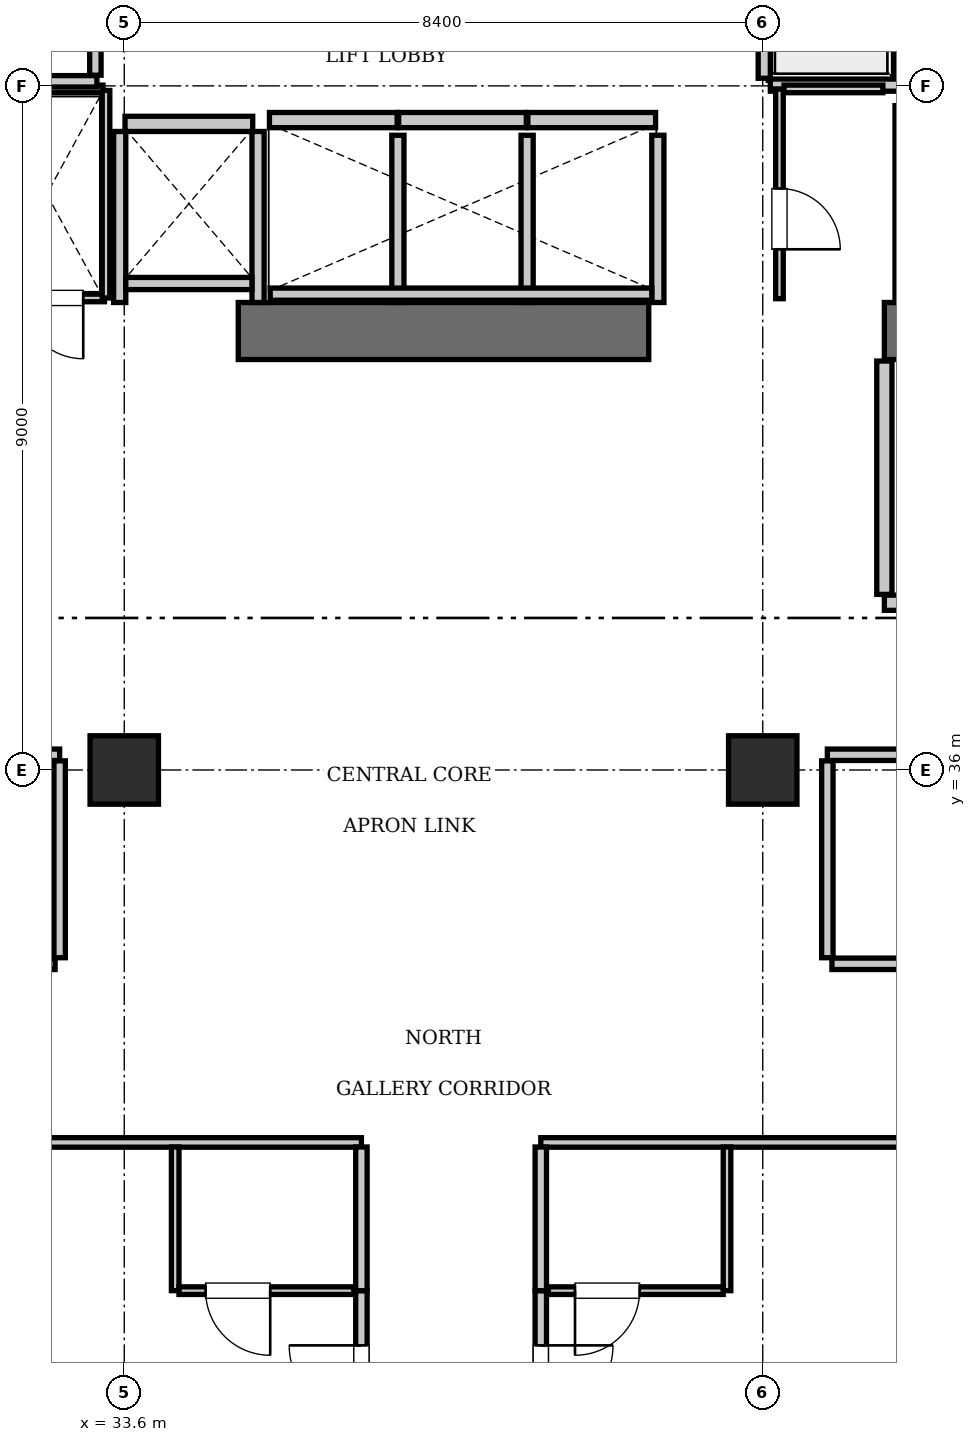
"""IFC4 building model, lengths in metres.
Left out: names, types, materials, properties, quantities, classifications, styles, units other than length and angle.
Written with IfcOpenShell. Run it as: python <this file> out.ifc"""

import sys

from ifc_helpers import new_model, si_unit, direction, frame, frame_2d, origin, origin_2d, place, context, subcontext, project, spatial, rectangle, extrude, element, fill, save


model = new_model("IFC4")
c1 = context("Model", 3, precision=1e-05, world=origin(), true_north=direction((0.0, 1.0)))
c2 = subcontext(c1, "Body", "Model", "MODEL_VIEW")
j1 = project(units=[si_unit("LENGTHUNIT", "METRE"), si_unit("PLANEANGLEUNIT", "RADIAN")], contexts=[c1])
p1 = place(None, origin())
s1 = spatial("IfcSite", under=j1, at=p1, CompositionType="ELEMENT")
p2 = place(p1, origin())
s2 = spatial("IfcBuilding", under=s1, at=p2, CompositionType="ELEMENT")
p3 = place(p2, frame((0.0, 0.0, 212.1)))
s3 = spatial("IfcBuildingStorey", under=s2, at=p3, CompositionType="ELEMENT", Elevation=212.1)
p4 = place(p3, frame((35.1, 41.775, 0.0), z_axis=(0.0, 0.0, 1.0), x_axis=(1.0, 0.0, 0.0)))
e1 = element("IfcWall", 1, at=p4, inside=s3, PredefinedType="SHEAR", context=c2, shape_type="SweptSolid", body=[
    extrude(rectangle(XDim=5.4, YDim=0.75, at=frame_2d((2.7, 0.0))), origin(), (0.0, 0.0, 1.0), 3.85),
])
p5 = place(p3, frame((43.6, 41.775, 0.0), z_axis=(0.0, 0.0, 1.0), x_axis=(1.0, 0.0, 0.0)))
e2 = element("IfcWall", 2, at=p5, inside=s3, PredefinedType="SHEAR", context=c2, shape_type="SweptSolid", body=[
    extrude(rectangle(XDim=6.8, YDim=0.75, at=frame_2d((3.4, 0.0))), origin(), (0.0, 0.0, 1.0), 3.85),
])
p6 = place(p5, frame((3.9, 0.0, 0.0)))
e3 = element("IfcOpeningElement", 3, at=p6, cuts=e2, PredefinedType="OPENING", context=c2, shape_type="SweptSolid", body=[
    extrude(rectangle(XDim=1.15, YDim=2.15, at=frame_2d((0.575, 1.075))), frame((0.0, 0.385, 0.0), z_axis=(0.0, -1.0, 0.0), x_axis=(1.0, 0.0, 0.0)), (0.0, 0.0, 1.0), 0.77),
])
p7 = place(p5, frame((0.55, 0.0, 0.0)))
e4 = element("IfcOpeningElement", 4, at=p7, cuts=e2, PredefinedType="OPENING", context=c2, shape_type="SweptSolid", body=[
    extrude(rectangle(XDim=1.1, YDim=2.2, at=frame_2d((0.55, 1.1))), frame((0.0, 0.385, 0.0), z_axis=(0.0, -1.0, 0.0), x_axis=(1.0, 0.0, 0.0)), (0.0, 0.0, 1.0), 0.77),
])
for number, where, z_axis, x_axis in (
    (5, (33.6, 36.0, 0.0), (0.0, 0.0, 1.0), (1.0, 0.0, 0.0)),
    (6, (42.0, 36.0, 0.0), (0.0, 0.0, 1.0), (1.0, 0.0, 0.0)),
):
    element("IfcColumn", number, at=place(p3, frame(where, z_axis=z_axis, x_axis=x_axis)), inside=s3, PredefinedType="COLUMN", context=c2, shape_type="SweptSolid", body=[
        extrude(rectangle(XDim=0.9, YDim=0.9, at=origin_2d()), origin(), (0.0, 0.0, 1.0), 3.85),
    ])
for number, where, z_axis, x_axis in (
    (7, (35.51, 44.55, 0.0), (0.0, 0.0, 1.0), (1.0, 0.0, 0.0)),
    (8, (37.21, 44.55, 0.0), (0.0, 0.0, 1.0), (1.0, 0.0, 0.0)),
):
    element("IfcWall", number, at=place(p3, frame(where, z_axis=z_axis, x_axis=x_axis)), inside=s3, PredefinedType="SOLIDWALL", context=c2, shape_type="SweptSolid", body=[
        extrude(rectangle(XDim=1.68, YDim=0.2, at=frame_2d((0.84, 0.0))), origin(), (0.0, 0.0, 1.0), 3.61),
    ])
p8 = place(p3, frame((38.91, 44.55, 0.0), z_axis=(0.0, 0.0, 1.0), x_axis=(1.0, 0.0, 0.0)))
e9 = element("IfcWall", 9, at=p8, inside=s3, PredefinedType="SOLIDWALL", context=c2, shape_type="SweptSolid", body=[
    extrude(rectangle(XDim=1.68, YDim=0.2, at=frame_2d((0.84, 0.0))), origin(), (0.0, 0.0, 1.0), 3.61),
])
p9 = place(p3, frame((33.61, 44.5, 0.0), z_axis=(0.0, 0.0, 1.0), x_axis=(1.0, 0.0, 0.0)))
e10 = element("IfcWall", 10, at=p9, inside=s3, PredefinedType="SOLIDWALL", context=c2, shape_type="SweptSolid", body=[
    extrude(rectangle(XDim=1.68, YDim=0.2, at=frame_2d((0.84, 0.0))), origin(), (0.0, 0.0, 1.0), 3.61),
])
p10 = place(p3, frame((43.82, 42.15, 0.0), z_axis=(0.0, 0.0, 1.0), x_axis=(0.0, 1.0, 0.0)))
e11 = element("IfcWall", 11, at=p10, inside=s3, PredefinedType="SOLIDWALL", context=c2, shape_type="SweptSolid", body=[
    extrude(rectangle(XDim=2.59, YDim=0.16, at=frame_2d((1.295, 0.0))), origin(), (0.0, 0.0, 1.0), 3.61),
])
for number, where, z_axis, x_axis in (
    (12, (42.02, 45.1, 0.0), (0.0, 0.0, 1.0), (0.0, 1.0, 0.0)),
    (13, (43.8, 45.1, 0.0), (0.0, 0.0, 1.0), (0.0, 1.0, 0.0)),
):
    element("IfcWall", number, at=place(p3, frame(where, z_axis=z_axis, x_axis=x_axis)), inside=s3, PredefinedType="SOLIDWALL", context=c2, shape_type="SweptSolid", body=[
        extrude(rectangle(XDim=1.95, YDim=0.16, at=frame_2d((0.975, 0.0))), origin(), (0.0, 0.0, 1.0), 3.61),
    ])
p11 = place(p3, frame((42.1, 45.01, 0.0), z_axis=(0.0, 0.0, 1.0), x_axis=(1.0, 0.0, 0.0)))
e14 = element("IfcWall", 14, at=p11, inside=s3, PredefinedType="SOLIDWALL", context=c2, shape_type="SweptSolid", body=[
    extrude(rectangle(XDim=3.45, YDim=0.16, at=frame_2d((1.725, 0.0))), origin(), (0.0, 0.0, 1.0), 3.61),
])
for number, where, z_axis, x_axis in (
    (15, (37.2, 42.15, 0.0), (0.0, 0.0, 1.0), (0.0, 1.0, 0.0)),
    (16, (38.9, 42.15, 0.0), (0.0, 0.0, 1.0), (0.0, 1.0, 0.0)),
    (17, (40.62, 42.15, 0.0), (0.0, 0.0, 1.0), (0.0, 1.0, 0.0)),
):
    element("IfcWall", number, at=place(p3, frame(where, z_axis=z_axis, x_axis=x_axis)), inside=s3, PredefinedType="SOLIDWALL", context=c2, shape_type="SweptSolid", body=[
        extrude(rectangle(XDim=2.2, YDim=0.16, at=frame_2d((1.1, 0.0))), origin(), (0.0, 0.0, 1.0), 3.61),
    ])
p12 = place(p3, frame((35.52, 42.26, 0.0), z_axis=(0.0, 0.0, 1.0), x_axis=(1.0, 0.0, 0.0)))
e18 = element("IfcWall", 18, at=p12, inside=s3, PredefinedType="SOLIDWALL", context=c2, shape_type="SweptSolid", body=[
    extrude(rectangle(XDim=5.02, YDim=0.16, at=frame_2d((2.51, 0.0))), origin(), (0.0, 0.0, 1.0), 3.61),
])
for number, where, z_axis, x_axis in (
    (19, (33.54, 42.15, 0.0), (0.0, 0.0, 1.0), (0.0, 1.0, 0.0)),
    (20, (35.36, 42.15, 0.0), (0.0, 0.0, 1.0), (0.0, 1.0, 0.0)),
):
    element("IfcWall", number, at=place(p3, frame(where, z_axis=z_axis, x_axis=x_axis)), inside=s3, PredefinedType="SOLIDWALL", context=c2, shape_type="SweptSolid", body=[
        extrude(rectangle(XDim=2.25, YDim=0.16, at=frame_2d((1.125, 0.0))), origin(), (0.0, 0.0, 1.0), 3.61),
    ])
p13 = place(p3, frame((33.62, 42.4, 0.0), z_axis=(0.0, 0.0, 1.0), x_axis=(1.0, 0.0, 0.0)))
e21 = element("IfcWall", 21, at=p13, inside=s3, PredefinedType="SOLIDWALL", context=c2, shape_type="SweptSolid", body=[
    extrude(rectangle(XDim=1.66, YDim=0.16, at=frame_2d((0.83, 0.0))), origin(), (0.0, 0.0, 1.0), 3.61),
])
p14 = place(p3, frame((43.6, 38.2, 0.0), z_axis=(0.0, 0.0, 1.0), x_axis=(1.0, 0.0, 0.0)))
e22 = element("IfcWall", 22, at=p14, inside=s3, PredefinedType="PARTITIONING", context=c2, shape_type="SweptSolid", body=[
    extrude(rectangle(XDim=5.8, YDim=0.2, at=frame_2d((2.9, 0.0))), origin(), (0.0, 0.0, 1.0), 3.61),
])
p15 = place(p14, frame((2.3, 0.0, 0.0)))
e23 = element("IfcOpeningElement", 23, at=p15, cuts=e22, PredefinedType="OPENING", context=c2, shape_type="SweptSolid", body=[
    extrude(rectangle(XDim=1.15, YDim=2.15, at=frame_2d((0.575, 1.075))), frame((0.0, 0.11, 0.0), z_axis=(0.0, -1.0, 0.0), x_axis=(1.0, 0.0, 0.0)), (0.0, 0.0, 1.0), 0.22),
])
p16 = place(p3, frame((43.6, 38.31, 0.0), z_axis=(0.0, 0.0, 1.0), x_axis=(0.0, 1.0, 0.0)))
e24 = element("IfcWall", 24, at=p16, inside=s3, PredefinedType="PARTITIONING", context=c2, shape_type="SweptSolid", body=[
    extrude(rectangle(XDim=3.07, YDim=0.2, at=frame_2d((1.535, 0.0))), origin(), (0.0, 0.0, 1.0), 3.61),
])
p17 = place(p3, frame((32.02, 42.21, 0.0), z_axis=(0.0, 0.0, 1.0), x_axis=(1.0, 0.0, 0.0)))
e25 = element("IfcWall", 25, at=p17, inside=s3, PredefinedType="PARTITIONING", context=c2, shape_type="SweptSolid", body=[
    extrude(rectangle(XDim=1.32, YDim=0.1, at=frame_2d((0.66, 0.0))), origin(), (0.0, 0.0, 1.0), 3.61),
])
p18 = place(p17, frame((0.24, 0.0, 0.0)))
e26 = element("IfcOpeningElement", 26, at=p18, cuts=e25, PredefinedType="OPENING", context=c2, shape_type="SweptSolid", body=[
    extrude(rectangle(XDim=0.8, YDim=2.05, at=frame_2d((0.4, 1.025))), frame((0.0, 0.06, 0.0), z_axis=(0.0, -1.0, 0.0), x_axis=(1.0, 0.0, 0.0)), (0.0, 0.0, 1.0), 0.12),
])
p19 = place(p3, frame((31.84, 44.96, 0.0), z_axis=(0.0, 0.0, 1.0), x_axis=(1.0, 0.0, 0.0)))
e27 = element("IfcWall", 27, at=p19, inside=s3, PredefinedType="PARTITIONING", context=c2, shape_type="SweptSolid", body=[
    extrude(rectangle(XDim=1.48, YDim=0.1, at=frame_2d((0.74, 0.0))), origin(), (0.0, 0.0, 1.0), 3.61),
])
p20 = place(p3, frame((33.36, 42.21, 0.0), z_axis=(0.0, 0.0, 1.0), x_axis=(0.0, 1.0, 0.0)))
e28 = element("IfcWall", 28, at=p20, inside=s3, PredefinedType="PARTITIONING", context=c2, shape_type="SweptSolid", body=[
    extrude(rectangle(XDim=2.73, YDim=0.1, at=frame_2d((1.365, 0.0))), origin(), (0.0, 0.0, 1.0), 3.61),
])
p21 = place(p3, frame((42.22, 42.2, 0.0), z_axis=(0.0, 0.0, 1.0), x_axis=(0.0, 1.0, 0.0)))
e29 = element("IfcWall", 29, at=p21, inside=s3, PredefinedType="PARTITIONING", context=c2, shape_type="SweptSolid", body=[
    extrude(rectangle(XDim=2.76, YDim=0.1, at=frame_2d((1.38, 0.0))), origin(), (0.0, 0.0, 1.0), 3.61),
])
p22 = place(p21, frame((0.65, 0.0, 0.0)))
e30 = element("IfcOpeningElement", 30, at=p22, cuts=e29, PredefinedType="OPENING", context=c2, shape_type="SweptSolid", body=[
    extrude(rectangle(XDim=0.8, YDim=2.05, at=frame_2d((0.4, 1.025))), frame((0.0, 0.06, 0.0), z_axis=(0.0, -1.0, 0.0), x_axis=(1.0, 0.0, 0.0)), (0.0, 0.0, 1.0), 0.12),
])
p23 = place(p3, frame((42.28, 44.96, 0.0), z_axis=(0.0, 0.0, 1.0), x_axis=(1.0, 0.0, 0.0)))
e31 = element("IfcWall", 31, at=p23, inside=s3, PredefinedType="PARTITIONING", context=c2, shape_type="SweptSolid", body=[
    extrude(rectangle(XDim=1.3, YDim=0.1, at=frame_2d((0.65, 0.0))), origin(), (0.0, 0.0, 1.0), 3.61),
])
p24 = place(p3, frame((30.06, 45.06, 0.0), z_axis=(0.0, 0.0, 1.0), x_axis=(1.0, 0.0, 0.0)))
e32 = element("IfcWall", 32, at=p24, inside=s3, PredefinedType="PARTITIONING", context=c2, shape_type="SweptSolid", body=[
    extrude(rectangle(XDim=3.18, YDim=0.15, at=frame_2d((1.59, 0.0))), origin(), (0.0, 0.0, 1.0), 3.61),
])
p25 = place(p3, frame((33.22, 45.14, 0.0), z_axis=(0.0, 0.0, 1.0), x_axis=(0.0, 1.0, 0.0)))
e33 = element("IfcWall", 33, at=p25, inside=s3, PredefinedType="PARTITIONING", context=c2, shape_type="SweptSolid", body=[
    extrude(rectangle(XDim=4.16, YDim=0.15, at=frame_2d((2.08, 0.0))), origin(), (0.0, 0.0, 1.0), 3.61),
])
p26 = place(p3, frame((28.32, 36.2, 0.0), z_axis=(0.0, 0.0, 1.0), x_axis=(1.0, 0.0, 0.0)))
e34 = element("IfcWall", 34, at=p26, inside=s3, PredefinedType="PARTITIONING", context=c2, shape_type="SweptSolid", body=[
    extrude(rectangle(XDim=4.43, YDim=0.15, at=frame_2d((2.215, 0.0))), origin(), (0.0, 0.0, 1.0), 3.61),
])
p27 = place(p3, frame((32.75, 33.53, 0.0), z_axis=(0.0, 0.0, 1.0), x_axis=(0.0, 1.0, 0.0)))
e35 = element("IfcWall", 35, at=p27, inside=s3, PredefinedType="PARTITIONING", context=c2, shape_type="SweptSolid", body=[
    extrude(rectangle(XDim=2.59, YDim=0.15, at=frame_2d((1.295, 0.0))), origin(), (0.0, 0.0, 1.0), 3.61),
])
p28 = place(p3, frame((28.38, 33.45, 0.0), z_axis=(0.0, 0.0, 1.0), x_axis=(1.0, 0.0, 0.0)))
e36 = element("IfcWall", 36, at=p28, inside=s3, PredefinedType="PARTITIONING", context=c2, shape_type="SweptSolid", body=[
    extrude(rectangle(XDim=4.31, YDim=0.15, at=frame_2d((2.155, 0.0))), origin(), (0.0, 0.0, 1.0), 3.61),
])
p29 = place(p28, frame((1.705, 0.0, 0.0)))
e37 = element("IfcOpeningElement", 37, at=p29, cuts=e36, PredefinedType="OPENING", context=c2, shape_type="SweptSolid", body=[
    extrude(rectangle(XDim=0.9, YDim=2.1, at=frame_2d((0.45, 1.05))), frame((0.0, 0.085, 0.0), z_axis=(0.0, -1.0, 0.0), x_axis=(1.0, 0.0, 0.0)), (0.0, 0.0, 1.0), 0.17),
])
p30 = place(p3, frame((42.85, 36.2, 0.0), z_axis=(0.0, 0.0, 1.0), x_axis=(1.0, 0.0, 0.0)))
e38 = element("IfcWall", 38, at=p30, inside=s3, PredefinedType="PARTITIONING", context=c2, shape_type="SweptSolid", body=[
    extrude(rectangle(XDim=4.43, YDim=0.15, at=frame_2d((2.215, 0.0))), origin(), (0.0, 0.0, 1.0), 3.61),
])
p31 = place(p3, frame((42.85, 33.53, 0.0), z_axis=(0.0, 0.0, 1.0), x_axis=(0.0, 1.0, 0.0)))
e39 = element("IfcWall", 39, at=p31, inside=s3, PredefinedType="PARTITIONING", context=c2, shape_type="SweptSolid", body=[
    extrude(rectangle(XDim=2.59, YDim=0.15, at=frame_2d((1.295, 0.0))), origin(), (0.0, 0.0, 1.0), 3.61),
])
p32 = place(p3, frame((42.91, 33.45, 0.0), z_axis=(0.0, 0.0, 1.0), x_axis=(1.0, 0.0, 0.0)))
e40 = element("IfcWall", 40, at=p32, inside=s3, PredefinedType="PARTITIONING", context=c2, shape_type="SweptSolid", body=[
    extrude(rectangle(XDim=4.31, YDim=0.15, at=frame_2d((2.155, 0.0))), origin(), (0.0, 0.0, 1.0), 3.61),
])
p33 = place(p32, frame((1.705, 0.0, 0.0)))
e41 = element("IfcOpeningElement", 41, at=p33, cuts=e40, PredefinedType="OPENING", context=c2, shape_type="SweptSolid", body=[
    extrude(rectangle(XDim=0.9, YDim=2.1, at=frame_2d((0.45, 1.05))), frame((0.0, 0.085, 0.0), z_axis=(0.0, -1.0, 0.0), x_axis=(1.0, 0.0, 0.0)), (0.0, 0.0, 1.0), 0.17),
])
p34 = place(p3, frame((13.2, 31.1, 0.0), z_axis=(0.0, 0.0, 1.0), x_axis=(1.0, 0.0, 0.0)))
e42 = element("IfcWall", 42, at=p34, inside=s3, PredefinedType="PARTITIONING", context=c2, shape_type="SweptSolid", body=[
    extrude(rectangle(XDim=23.52, YDim=0.125, at=frame_2d((11.76, 0.0))), origin(), (0.0, 0.0, 1.0), 3.61),
])
p35 = place(p3, frame((39.08, 31.1, 0.0), z_axis=(0.0, 0.0, 1.0), x_axis=(1.0, 0.0, 0.0)))
e43 = element("IfcWall", 43, at=p35, inside=s3, PredefinedType="PARTITIONING", context=c2, shape_type="SweptSolid", body=[
    extrude(rectangle(XDim=23.32, YDim=0.125, at=frame_2d((11.66, 0.0))), origin(), (0.0, 0.0, 1.0), 3.61),
])
p36 = place(p3, frame((36.72, 26.76, 0.0), z_axis=(0.0, 0.0, 1.0), x_axis=(0.0, 1.0, 0.0)))
e44 = element("IfcWall", 44, at=p36, inside=s3, PredefinedType="PARTITIONING", context=c2, shape_type="SweptSolid", body=[
    extrude(rectangle(XDim=2.39, YDim=0.15, at=frame_2d((1.195, 0.0))), origin(), (0.0, 0.0, 1.0), 3.61),
])
p37 = place(p36, frame((0.72, 0.0, 0.0)))
e45 = element("IfcOpeningElement", 45, at=p37, cuts=e44, PredefinedType="OPENING", context=c2, shape_type="SweptSolid", body=[
    extrude(rectangle(XDim=0.95, YDim=2.15, at=frame_2d((0.475, 1.075))), frame((0.0, 0.085, 0.0), z_axis=(0.0, -1.0, 0.0), x_axis=(1.0, 0.0, 0.0)), (0.0, 0.0, 1.0), 0.17),
])
p38 = place(p3, frame((36.72, 29.15, 0.0), z_axis=(0.0, 0.0, 1.0), x_axis=(0.0, 1.0, 0.0)))
e46 = element("IfcWall", 46, at=p38, inside=s3, PredefinedType="PARTITIONING", context=c2, shape_type="SweptSolid", body=[
    extrude(rectangle(XDim=1.89, YDim=0.15, at=frame_2d((0.945, 0.0))), origin(), (0.0, 0.0, 1.0), 3.61),
])
p39 = place(p3, frame((34.27, 29.15, 0.0), z_axis=(0.0, 0.0, 1.0), x_axis=(0.0, 1.0, 0.0)))
e47 = element("IfcWall", 47, at=p39, inside=s3, PredefinedType="PARTITIONING", context=c2, shape_type="SweptSolid", body=[
    extrude(rectangle(XDim=1.89, YDim=0.1, at=frame_2d((0.945, 0.0))), origin(), (0.0, 0.0, 1.0), 3.61),
])
p40 = place(p3, frame((34.32, 29.15, 0.0), z_axis=(0.0, 0.0, 1.0), x_axis=(1.0, 0.0, 0.0)))
e48 = element("IfcWall", 48, at=p40, inside=s3, PredefinedType="PARTITIONING", context=c2, shape_type="SweptSolid", body=[
    extrude(rectangle(XDim=2.3, YDim=0.1, at=frame_2d((1.15, 0.0))), origin(), (0.0, 0.0, 1.0), 3.61),
])
p41 = place(p40, frame((0.35, 0.0, 0.0)))
e49 = element("IfcOpeningElement", 49, at=p41, cuts=e48, PredefinedType="OPENING", context=c2, shape_type="SweptSolid", body=[
    extrude(rectangle(XDim=0.85, YDim=2.1, at=frame_2d((0.425, 1.05))), frame((0.0, 0.06, 0.0), z_axis=(0.0, -1.0, 0.0), x_axis=(1.0, 0.0, 0.0)), (0.0, 0.0, 1.0), 0.12),
])
p42 = place(p3, frame((39.08, 26.76, 0.0), z_axis=(0.0, 0.0, 1.0), x_axis=(0.0, 1.0, 0.0)))
e50 = element("IfcWall", 50, at=p42, inside=s3, PredefinedType="PARTITIONING", context=c2, shape_type="SweptSolid", body=[
    extrude(rectangle(XDim=2.39, YDim=0.15, at=frame_2d((1.195, 0.0))), origin(), (0.0, 0.0, 1.0), 3.61),
])
p43 = place(p42, frame((0.72, 0.0, 0.0)))
e51 = element("IfcOpeningElement", 51, at=p43, cuts=e50, PredefinedType="OPENING", context=c2, shape_type="SweptSolid", body=[
    extrude(rectangle(XDim=0.95, YDim=2.15, at=frame_2d((0.475, 1.075))), frame((0.0, 0.085, 0.0), z_axis=(0.0, -1.0, 0.0), x_axis=(1.0, 0.0, 0.0)), (0.0, 0.0, 1.0), 0.17),
])
p44 = place(p3, frame((39.08, 29.15, 0.0), z_axis=(0.0, 0.0, 1.0), x_axis=(0.0, 1.0, 0.0)))
e52 = element("IfcWall", 52, at=p44, inside=s3, PredefinedType="PARTITIONING", context=c2, shape_type="SweptSolid", body=[
    extrude(rectangle(XDim=1.89, YDim=0.15, at=frame_2d((0.945, 0.0))), origin(), (0.0, 0.0, 1.0), 3.61),
])
p45 = place(p3, frame((41.53, 29.15, 0.0), z_axis=(0.0, 0.0, 1.0), x_axis=(0.0, 1.0, 0.0)))
e53 = element("IfcWall", 53, at=p45, inside=s3, PredefinedType="PARTITIONING", context=c2, shape_type="SweptSolid", body=[
    extrude(rectangle(XDim=1.89, YDim=0.1, at=frame_2d((0.945, 0.0))), origin(), (0.0, 0.0, 1.0), 3.61),
])
p46 = place(p3, frame((39.18, 29.15, 0.0), z_axis=(0.0, 0.0, 1.0), x_axis=(1.0, 0.0, 0.0)))
e54 = element("IfcWall", 54, at=p46, inside=s3, PredefinedType="PARTITIONING", context=c2, shape_type="SweptSolid", body=[
    extrude(rectangle(XDim=2.3, YDim=0.1, at=frame_2d((1.15, 0.0))), origin(), (0.0, 0.0, 1.0), 3.61),
])
p47 = place(p46, frame((0.35, 0.0, 0.0)))
e55 = element("IfcOpeningElement", 55, at=p47, cuts=e54, PredefinedType="OPENING", context=c2, shape_type="SweptSolid", body=[
    extrude(rectangle(XDim=0.85, YDim=2.1, at=frame_2d((0.425, 1.05))), frame((0.0, 0.06, 0.0), z_axis=(0.0, -1.0, 0.0), x_axis=(1.0, 0.0, 0.0)), (0.0, 0.0, 1.0), 0.12),
])
p48 = place(p18, frame((0.8, 0.0, 0.0), z_axis=(0.0, 0.0, 1.0), x_axis=(-1.0, 0.0, 0.0)))
e56 = element("IfcDoor", 56, at=p48, inside=s3, OperationType="SINGLE_SWING_LEFT", PredefinedType="DOOR", context=c2, shape_type="SweptSolid", body=[
    extrude(rectangle(XDim=0.8, YDim=2.05, at=frame_2d((0.4, 1.025))), frame((0.0, 0.025, 0.0), z_axis=(0.0, -1.0, 0.0), x_axis=(1.0, 0.0, 0.0)), (0.0, 0.0, 1.0), 0.05),
])
fill(e26, e56)
p49 = place(p22, frame((0.8, 0.0, 0.0), z_axis=(0.0, 0.0, 1.0), x_axis=(-1.0, 0.0, 0.0)))
e57 = element("IfcDoor", 57, at=p49, inside=s3, OperationType="SINGLE_SWING_RIGHT", PredefinedType="DOOR", context=c2, shape_type="SweptSolid", body=[
    extrude(rectangle(XDim=0.8, YDim=2.05, at=frame_2d((0.4, 1.025))), frame((0.0, 0.025, 0.0), z_axis=(0.0, -1.0, 0.0), x_axis=(1.0, 0.0, 0.0)), (0.0, 0.0, 1.0), 0.05),
])
fill(e30, e57)
p50 = place(p41, frame((0.85, 0.0, 0.0), z_axis=(0.0, 0.0, 1.0), x_axis=(-1.0, 0.0, 0.0)))
e58 = element("IfcDoor", 58, at=p50, inside=s3, OperationType="SINGLE_SWING_LEFT", PredefinedType="DOOR", context=c2, shape_type="SweptSolid", body=[
    extrude(rectangle(XDim=0.85, YDim=2.1, at=frame_2d((0.425, 1.05))), frame((0.0, 0.025, 0.0), z_axis=(0.0, -1.0, 0.0), x_axis=(1.0, 0.0, 0.0)), (0.0, 0.0, 1.0), 0.05),
])
fill(e49, e58)
p51 = place(p37, origin())
e59 = element("IfcDoor", 59, at=p51, inside=s3, OperationType="SINGLE_SWING_RIGHT", PredefinedType="DOOR", context=c2, shape_type="SweptSolid", body=[
    extrude(rectangle(XDim=0.95, YDim=2.15, at=frame_2d((0.475, 1.075))), frame((0.0, 0.025, 0.0), z_axis=(0.0, -1.0, 0.0), x_axis=(1.0, 0.0, 0.0)), (0.0, 0.0, 1.0), 0.05),
])
fill(e45, e59)
p52 = place(p47, frame((0.85, 0.0, 0.0), z_axis=(0.0, 0.0, 1.0), x_axis=(-1.0, 0.0, 0.0)))
e60 = element("IfcDoor", 60, at=p52, inside=s3, OperationType="SINGLE_SWING_RIGHT", PredefinedType="DOOR", context=c2, shape_type="SweptSolid", body=[
    extrude(rectangle(XDim=0.85, YDim=2.1, at=frame_2d((0.425, 1.05))), frame((0.0, 0.025, 0.0), z_axis=(0.0, -1.0, 0.0), x_axis=(1.0, 0.0, 0.0)), (0.0, 0.0, 1.0), 0.05),
])
fill(e55, e60)
p53 = place(p43, frame((0.95, 0.0, 0.0), z_axis=(0.0, 0.0, 1.0), x_axis=(-1.0, 0.0, 0.0)))
e61 = element("IfcDoor", 61, at=p53, inside=s3, OperationType="SINGLE_SWING_LEFT", PredefinedType="DOOR", context=c2, shape_type="SweptSolid", body=[
    extrude(rectangle(XDim=0.95, YDim=2.15, at=frame_2d((0.475, 1.075))), frame((0.0, 0.025, 0.0), z_axis=(0.0, -1.0, 0.0), x_axis=(1.0, 0.0, 0.0)), (0.0, 0.0, 1.0), 0.05),
])
fill(e51, e61)
save(model, sys.argv[1])
